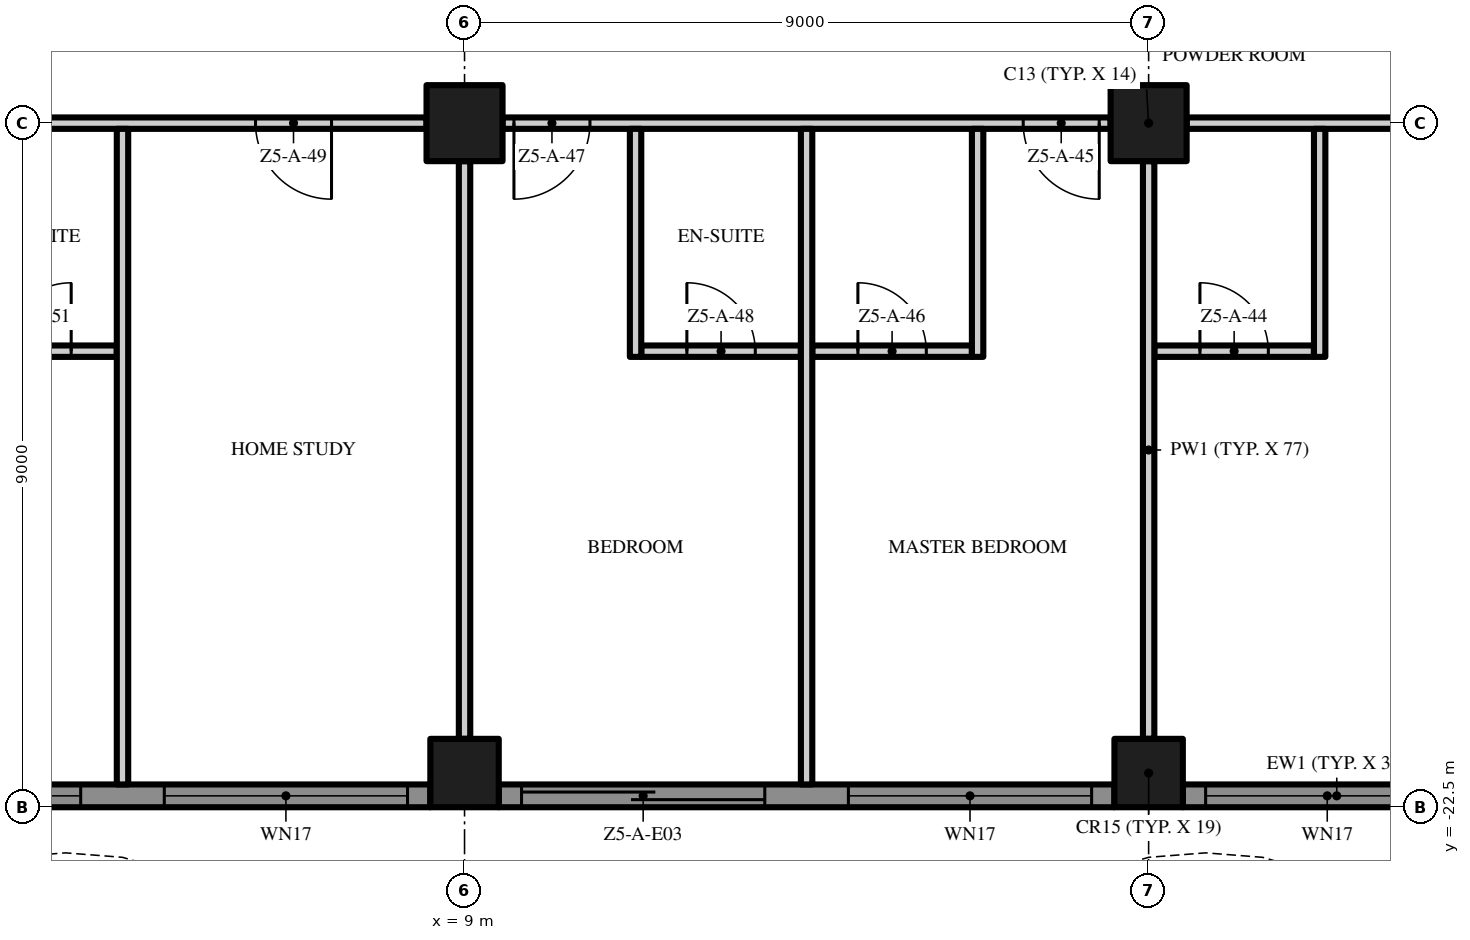
"""IFC4 building model, lengths in metres.
Left out: names, types, materials, properties, quantities, classifications, styles, units other than length and angle.
Written with IfcOpenShell. Run it as: python <this file> out.ifc"""

import sys

from ifc_helpers import new_model, si_unit, direction, frame, frame_2d, origin, origin_2d, place, context, subcontext, project, spatial, polyline, rectangle, outline, extrude, element, fill, save


model = new_model("IFC4")
c1 = context("Model", 3, precision=1e-05, world=origin(), true_north=direction((0.0, 1.0)))
c2 = subcontext(c1, "Body", "Model", "MODEL_VIEW")
j1 = project(units=[si_unit("LENGTHUNIT", "METRE"), si_unit("PLANEANGLEUNIT", "RADIAN")], contexts=[c1])
p1 = place(None, origin())
s1 = spatial("IfcSite", under=j1, at=p1, CompositionType="ELEMENT")
p2 = place(p1, origin())
s2 = spatial("IfcBuilding", under=s1, at=p2, CompositionType="ELEMENT")
p3 = place(p2, frame((0.0, 0.0, 242.6)))
s3 = spatial("IfcBuildingStorey", under=s2, at=p3, CompositionType="ELEMENT", Elevation=242.6)
p4 = place(p3, frame((18.0, -13.5, 0.0), z_axis=(0.0, 0.0, 1.0), x_axis=(1.0, 0.0, 0.0)))
e1 = element("IfcColumn", 1, at=p4, inside=s3, PredefinedType="COLUMN", context=c2, shape_type="SweptSolid", body=[
    extrude(rectangle(XDim=1.0, YDim=1.0, at=origin_2d()), origin(), (0.0, 0.0, 1.0), 3.5),
])
p5 = place(p3, frame((18.0, -22.05, 0.0), z_axis=(0.0, 0.0, 1.0), x_axis=(1.0, 0.0, 0.0)))
e2 = element("IfcColumn", 2, at=p5, inside=s3, PredefinedType="COLUMN", context=c2, shape_type="SweptSolid", body=[
    extrude(rectangle(XDim=0.9, YDim=0.9, at=origin_2d()), origin(), (0.0, 0.0, 1.0), 3.5),
])
p6 = place(p3, frame((9.0, -13.5, 0.0), z_axis=(0.0, 0.0, 1.0), x_axis=(1.0, 0.0, 0.0)))
e3 = element("IfcColumn", 3, at=p6, inside=s3, PredefinedType="COLUMN", context=c2, shape_type="SweptSolid", body=[
    extrude(rectangle(XDim=1.0, YDim=1.0, at=origin_2d()), origin(), (0.0, 0.0, 1.0), 3.5),
])
p7 = place(p3, frame((9.0, -22.05, 0.0), z_axis=(0.0, 0.0, 1.0), x_axis=(1.0, 0.0, 0.0)))
e4 = element("IfcColumn", 4, at=p7, inside=s3, PredefinedType="COLUMN", context=c2, shape_type="SweptSolid", body=[
    extrude(rectangle(XDim=0.9, YDim=0.9, at=origin_2d()), origin(), (0.0, 0.0, 1.0), 3.5),
])
p8 = place(p3, frame((8.55, -22.35, 0.0), z_axis=(0.0, 0.0, 1.0), x_axis=(-1.0, 0.0, 0.0)))
e5 = element("IfcWall", 5, at=p8, inside=s3, PredefinedType="SOLIDWALL", context=c2, shape_type="SweptSolid", body=[
    extrude(rectangle(XDim=8.1, YDim=0.3, at=frame_2d((4.05, 0.0))), origin(), (0.0, 0.0, 1.0), 3.5),
])
p9 = place(p8, frame((4.6, 0.0, 0.45)))
e6 = element("IfcOpeningElement", 6, at=p9, cuts=e5, PredefinedType="OPENING", context=c2, shape_type="SweptSolid", body=[
    extrude(rectangle(XDim=3.2, YDim=2.65, at=frame_2d((1.6, 1.325))), frame((0.0, 0.16, 0.0), z_axis=(0.0, -1.0, 0.0), x_axis=(1.0, 0.0, 0.0)), (0.0, 0.0, 1.0), 0.32),
])
p10 = place(p8, frame((0.3, 0.0, 0.45)))
e7 = element("IfcOpeningElement", 7, at=p10, cuts=e5, PredefinedType="OPENING", context=c2, shape_type="SweptSolid", body=[
    extrude(rectangle(XDim=3.2, YDim=2.65, at=frame_2d((1.6, 1.325))), frame((0.0, 0.16, 0.0), z_axis=(0.0, -1.0, 0.0), x_axis=(1.0, 0.0, 0.0)), (0.0, 0.0, 1.0), 0.32),
])
p11 = place(p3, frame((17.55, -22.35, 0.0), z_axis=(0.0, 0.0, 1.0), x_axis=(-1.0, 0.0, 0.0)))
e8 = element("IfcWall", 8, at=p11, inside=s3, PredefinedType="SOLIDWALL", context=c2, shape_type="SweptSolid", body=[
    extrude(rectangle(XDim=8.1, YDim=0.3, at=frame_2d((4.05, 0.0))), origin(), (0.0, 0.0, 1.0), 3.5),
])
p12 = place(p11, frame((4.6, 0.0, 0.0)))
e9 = element("IfcOpeningElement", 9, at=p12, cuts=e8, PredefinedType="OPENING", context=c2, shape_type="SweptSolid", body=[
    extrude(rectangle(XDim=3.2, YDim=2.4, at=frame_2d((1.6, 1.2))), frame((0.0, 0.16, 0.0), z_axis=(0.0, -1.0, 0.0), x_axis=(1.0, 0.0, 0.0)), (0.0, 0.0, 1.0), 0.32),
])
p13 = place(p11, frame((0.3, 0.0, 0.45)))
e10 = element("IfcOpeningElement", 10, at=p13, cuts=e8, PredefinedType="OPENING", context=c2, shape_type="SweptSolid", body=[
    extrude(rectangle(XDim=3.2, YDim=2.65, at=frame_2d((1.6, 1.325))), frame((0.0, 0.16, 0.0), z_axis=(0.0, -1.0, 0.0), x_axis=(1.0, 0.0, 0.0)), (0.0, 0.0, 1.0), 0.32),
])
p14 = place(p3, frame((22.5, -22.35, 0.0), z_axis=(0.0, 0.0, 1.0), x_axis=(-1.0, 0.0, 0.0)))
e11 = element("IfcWall", 11, at=p14, inside=s3, PredefinedType="SOLIDWALL", context=c2, shape_type="SweptSolid", body=[
    extrude(rectangle(XDim=4.05, YDim=0.3, at=frame_2d((2.025, 0.0))), origin(), (0.0, 0.0, 1.0), 3.5),
])
p15 = place(p14, frame((0.55, 0.0, 0.45)))
e12 = element("IfcOpeningElement", 12, at=p15, cuts=e11, PredefinedType="OPENING", context=c2, shape_type="SweptSolid", body=[
    extrude(rectangle(XDim=3.2, YDim=2.65, at=frame_2d((1.6, 1.325))), frame((0.0, 0.16, 0.0), z_axis=(0.0, -1.0, 0.0), x_axis=(1.0, 0.0, 0.0)), (0.0, 0.0, 1.0), 0.32),
])
p16 = place(p3, origin())
e13 = element("IfcWall", 13, at=p16, inside=s3, PredefinedType="USERDEFINED", context=c2, shape_type="SweptSolid", body=[
    extrude(outline(polyline([(-22.5, -24.3), (-21.0, -25.005), (-19.5, -25.441), (-18.75, -25.5), (-18.0, -25.441), (-16.5, -25.005), (-15.0, -24.3), (-13.5, -23.595), (-12.0, -23.159), (-11.25, -23.1), (-10.5, -23.159), (-9.0, -23.595), (-7.5, -24.3), (-6.0, -25.005), (-4.5, -25.441), (-3.75, -25.5), (-3.0, -25.441), (-1.5, -25.005), (0.0, -24.3), (1.5, -23.595), (3.0, -23.159), (3.75, -23.1), (4.5, -23.159), (6.0, -23.595), (7.5, -24.3), (9.0, -25.005), (10.5, -25.441), (11.25, -25.5), (12.0, -25.441), (13.5, -25.005), (15.0, -24.3), (16.5, -23.595), (18.0, -23.159), (18.75, -23.1), (19.5, -23.159), (21.0, -23.595), (22.5, -24.3), (22.606, -24.074), (21.089, -23.36), (19.545, -22.911), (18.75, -22.849), (17.955, -22.911), (16.411, -23.36), (14.894, -24.074), (13.411, -24.771), (11.955, -25.194), (11.25, -25.249), (10.545, -25.194), (9.089, -24.771), (7.606, -24.074), (6.089, -23.36), (4.545, -22.911), (3.75, -22.849), (2.955, -22.911), (1.411, -23.36), (-0.106, -24.074), (-1.589, -24.771), (-3.045, -25.194), (-3.75, -25.249), (-4.455, -25.194), (-5.911, -24.771), (-7.394, -24.074), (-8.911, -23.36), (-10.455, -22.911), (-11.25, -22.849), (-12.045, -22.911), (-13.589, -23.36), (-15.106, -24.074), (-16.589, -24.771), (-18.045, -25.194), (-18.75, -25.249), (-19.455, -25.194), (-20.911, -24.771), (-22.394, -24.074), (-22.5, -24.3)])), origin(), (0.0, 0.0, 1.0), 0.9),
])
p17 = place(p3, frame((2.325, -16.5, 0.0), z_axis=(0.0, 0.0, 1.0), x_axis=(1.0, 0.0, 0.0)))
e14 = element("IfcWall", 14, at=p17, inside=s3, PredefinedType="PARTITIONING", context=c2, shape_type="SweptSolid", body=[
    extrude(rectangle(XDim=2.1, YDim=0.15, at=frame_2d((1.05, 0.0))), origin(), (0.0, 0.0, 1.0), 3.5),
])
p18 = place(p17, frame((0.6, 0.0, 0.0)))
e15 = element("IfcOpeningElement", 15, at=p18, cuts=e14, PredefinedType="OPENING", context=c2, shape_type="SweptSolid", body=[
    extrude(rectangle(XDim=0.9, YDim=2.1, at=frame_2d((0.45, 1.05))), frame((0.0, 0.085, 0.0), z_axis=(0.0, -1.0, 0.0), x_axis=(1.0, 0.0, 0.0)), (0.0, 0.0, 1.0), 0.17),
])
p19 = place(p3, frame((11.325, -16.5, 0.0), z_axis=(0.0, 0.0, 1.0), x_axis=(1.0, 0.0, 0.0)))
e16 = element("IfcWall", 16, at=p19, inside=s3, PredefinedType="PARTITIONING", context=c2, shape_type="SweptSolid", body=[
    extrude(rectangle(XDim=2.1, YDim=0.15, at=frame_2d((1.05, 0.0))), origin(), (0.0, 0.0, 1.0), 3.5),
])
p20 = place(p19, frame((0.6, 0.0, 0.0)))
e17 = element("IfcOpeningElement", 17, at=p20, cuts=e16, PredefinedType="OPENING", context=c2, shape_type="SweptSolid", body=[
    extrude(rectangle(XDim=0.9, YDim=2.1, at=frame_2d((0.45, 1.05))), frame((0.0, 0.085, 0.0), z_axis=(0.0, -1.0, 0.0), x_axis=(1.0, 0.0, 0.0)), (0.0, 0.0, 1.0), 0.17),
])
p21 = place(p3, frame((13.575, -16.5, 0.0), z_axis=(0.0, 0.0, 1.0), x_axis=(1.0, 0.0, 0.0)))
e18 = element("IfcWall", 18, at=p21, inside=s3, PredefinedType="PARTITIONING", context=c2, shape_type="SweptSolid", body=[
    extrude(rectangle(XDim=2.1, YDim=0.15, at=frame_2d((1.05, 0.0))), origin(), (0.0, 0.0, 1.0), 3.5),
])
p22 = place(p21, frame((0.6, 0.0, 0.0)))
e19 = element("IfcOpeningElement", 19, at=p22, cuts=e18, PredefinedType="OPENING", context=c2, shape_type="SweptSolid", body=[
    extrude(rectangle(XDim=0.9, YDim=2.1, at=frame_2d((0.45, 1.05))), frame((0.0, 0.085, 0.0), z_axis=(0.0, -1.0, 0.0), x_axis=(1.0, 0.0, 0.0)), (0.0, 0.0, 1.0), 0.17),
])
p23 = place(p3, frame((18.075, -16.5, 0.0), z_axis=(0.0, 0.0, 1.0), x_axis=(1.0, 0.0, 0.0)))
e20 = element("IfcWall", 20, at=p23, inside=s3, PredefinedType="PARTITIONING", context=c2, shape_type="SweptSolid", body=[
    extrude(rectangle(XDim=2.1, YDim=0.15, at=frame_2d((1.05, 0.0))), origin(), (0.0, 0.0, 1.0), 3.5),
])
p24 = place(p23, frame((0.6, 0.0, 0.0)))
e21 = element("IfcOpeningElement", 21, at=p24, cuts=e20, PredefinedType="OPENING", context=c2, shape_type="SweptSolid", body=[
    extrude(rectangle(XDim=0.9, YDim=2.1, at=frame_2d((0.45, 1.05))), frame((0.0, 0.085, 0.0), z_axis=(0.0, -1.0, 0.0), x_axis=(1.0, 0.0, 0.0)), (0.0, 0.0, 1.0), 0.17),
])
p25 = place(p3, frame((8.5, -13.5, 0.0), z_axis=(0.0, 0.0, 1.0), x_axis=(-1.0, 0.0, 0.0)))
e22 = element("IfcWall", 22, at=p25, inside=s3, PredefinedType="PARTITIONING", context=c2, shape_type="SweptSolid", body=[
    extrude(rectangle(XDim=8.0, YDim=0.15, at=frame_2d((4.0, 0.0))), origin(), (0.0, 0.0, 1.0), 3.5),
])
p26 = place(p25, frame((1.25, 0.0, 0.0)))
e23 = element("IfcOpeningElement", 23, at=p26, cuts=e22, PredefinedType="OPENING", context=c2, shape_type="SweptSolid", body=[
    extrude(rectangle(XDim=1.0, YDim=2.4, at=frame_2d((0.5, 1.2))), frame((0.0, 0.085, 0.0), z_axis=(0.0, -1.0, 0.0), x_axis=(1.0, 0.0, 0.0)), (0.0, 0.0, 1.0), 0.17),
])
p27 = place(p25, frame((6.85, 0.0, 0.0)))
e24 = element("IfcOpeningElement", 24, at=p27, cuts=e22, PredefinedType="OPENING", context=c2, shape_type="SweptSolid", body=[
    extrude(rectangle(XDim=1.0, YDim=2.4, at=frame_2d((0.5, 1.2))), frame((0.0, 0.085, 0.0), z_axis=(0.0, -1.0, 0.0), x_axis=(1.0, 0.0, 0.0)), (0.0, 0.0, 1.0), 0.17),
])
p28 = place(p3, frame((17.5, -13.5, 0.0), z_axis=(0.0, 0.0, 1.0), x_axis=(-1.0, 0.0, 0.0)))
e25 = element("IfcWall", 25, at=p28, inside=s3, PredefinedType="PARTITIONING", context=c2, shape_type="SweptSolid", body=[
    extrude(rectangle(XDim=8.0, YDim=0.15, at=frame_2d((4.0, 0.0))), origin(), (0.0, 0.0, 1.0), 3.5),
])
p29 = place(p28, frame((0.15, 0.0, 0.0)))
e26 = element("IfcOpeningElement", 26, at=p29, cuts=e25, PredefinedType="OPENING", context=c2, shape_type="SweptSolid", body=[
    extrude(rectangle(XDim=1.0, YDim=2.4, at=frame_2d((0.5, 1.2))), frame((0.0, 0.085, 0.0), z_axis=(0.0, -1.0, 0.0), x_axis=(1.0, 0.0, 0.0)), (0.0, 0.0, 1.0), 0.17),
])
p30 = place(p28, frame((6.85, 0.0, 0.0)))
e27 = element("IfcOpeningElement", 27, at=p30, cuts=e25, PredefinedType="OPENING", context=c2, shape_type="SweptSolid", body=[
    extrude(rectangle(XDim=1.0, YDim=2.4, at=frame_2d((0.5, 1.2))), frame((0.0, 0.085, 0.0), z_axis=(0.0, -1.0, 0.0), x_axis=(1.0, 0.0, 0.0)), (0.0, 0.0, 1.0), 0.17),
])
p31 = place(p3, frame((26.1, -13.5, 0.0), z_axis=(0.0, 0.0, 1.0), x_axis=(-1.0, 0.0, 0.0)))
e28 = element("IfcWall", 28, at=p31, inside=s3, PredefinedType="PARTITIONING", context=c2, shape_type="SweptSolid", body=[
    extrude(rectangle(XDim=7.6, YDim=0.15, at=frame_2d((3.8, 0.0))), origin(), (0.0, 0.0, 1.0), 3.5),
])
p32 = place(p31, frame((1.6, 0.0, 0.0)))
e29 = element("IfcOpeningElement", 29, at=p32, cuts=e28, PredefinedType="OPENING", context=c2, shape_type="SweptSolid", body=[
    extrude(rectangle(XDim=1.8, YDim=2.4, at=frame_2d((0.9, 1.2))), frame((0.0, 0.085, 0.0), z_axis=(0.0, -1.0, 0.0), x_axis=(1.0, 0.0, 0.0)), (0.0, 0.0, 1.0), 0.17),
])
p33 = place(p3, frame((4.5, -22.2, 0.0), z_axis=(0.0, 0.0, 1.0), x_axis=(0.0, 1.0, 0.0)))
e30 = element("IfcWall", 30, at=p33, inside=s3, PredefinedType="PARTITIONING", context=c2, shape_type="SweptSolid", body=[
    extrude(rectangle(XDim=8.625, YDim=0.15, at=frame_2d((4.312, 0.0))), origin(), (0.0, 0.0, 1.0), 3.5),
])
p34 = place(p3, frame((9.0, -21.6, 0.0), z_axis=(0.0, 0.0, 1.0), x_axis=(0.0, 1.0, 0.0)))
e31 = element("IfcWall", 31, at=p34, inside=s3, PredefinedType="PARTITIONING", context=c2, shape_type="SweptSolid", body=[
    extrude(rectangle(XDim=7.6, YDim=0.15, at=frame_2d((3.8, 0.0))), origin(), (0.0, 0.0, 1.0), 3.5),
])
p35 = place(p3, frame((11.25, -16.575, 0.0), z_axis=(0.0, 0.0, 1.0), x_axis=(0.0, 1.0, 0.0)))
e32 = element("IfcWall", 32, at=p35, inside=s3, PredefinedType="PARTITIONING", context=c2, shape_type="SweptSolid", body=[
    extrude(rectangle(XDim=3.0, YDim=0.15, at=frame_2d((1.5, 0.0))), origin(), (0.0, 0.0, 1.0), 3.5),
])
p36 = place(p3, frame((13.5, -22.2, 0.0), z_axis=(0.0, 0.0, 1.0), x_axis=(0.0, 1.0, 0.0)))
e33 = element("IfcWall", 33, at=p36, inside=s3, PredefinedType="PARTITIONING", context=c2, shape_type="SweptSolid", body=[
    extrude(rectangle(XDim=8.625, YDim=0.15, at=frame_2d((4.312, 0.0))), origin(), (0.0, 0.0, 1.0), 3.5),
])
p37 = place(p3, frame((15.75, -16.575, 0.0), z_axis=(0.0, 0.0, 1.0), x_axis=(0.0, 1.0, 0.0)))
e34 = element("IfcWall", 34, at=p37, inside=s3, PredefinedType="PARTITIONING", context=c2, shape_type="SweptSolid", body=[
    extrude(rectangle(XDim=3.0, YDim=0.15, at=frame_2d((1.5, 0.0))), origin(), (0.0, 0.0, 1.0), 3.5),
])
p38 = place(p3, frame((18.0, -21.6, 0.0), z_axis=(0.0, 0.0, 1.0), x_axis=(0.0, 1.0, 0.0)))
e35 = element("IfcWall", 35, at=p38, inside=s3, PredefinedType="PARTITIONING", context=c2, shape_type="SweptSolid", body=[
    extrude(rectangle(XDim=7.6, YDim=0.15, at=frame_2d((3.8, 0.0))), origin(), (0.0, 0.0, 1.0), 3.5),
])
p39 = place(p3, frame((20.25, -16.575, 0.0), z_axis=(0.0, 0.0, 1.0), x_axis=(0.0, 1.0, 0.0)))
e36 = element("IfcWall", 36, at=p39, inside=s3, PredefinedType="PARTITIONING", context=c2, shape_type="SweptSolid", body=[
    extrude(rectangle(XDim=3.0, YDim=0.15, at=frame_2d((1.5, 0.0))), origin(), (0.0, 0.0, 1.0), 3.5),
])
p40 = place(p9, origin())
e37 = element("IfcWindow", 37, at=p40, inside=s3, PartitioningType="SINGLE_PANEL", PredefinedType="WINDOW", context=c2, shape_type="SweptSolid", body=[
    extrude(rectangle(XDim=3.2, YDim=2.65, at=frame_2d((1.6, 1.325))), frame((0.0, 0.03, 0.0), z_axis=(0.0, -1.0, 0.0), x_axis=(1.0, 0.0, 0.0)), (0.0, 0.0, 1.0), 0.06),
])
fill(e6, e37)
p41 = place(p10, origin())
e38 = element("IfcWindow", 38, at=p41, inside=s3, PartitioningType="SINGLE_PANEL", PredefinedType="WINDOW", context=c2, shape_type="SweptSolid", body=[
    extrude(rectangle(XDim=3.2, YDim=2.65, at=frame_2d((1.6, 1.325))), frame((0.0, 0.03, 0.0), z_axis=(0.0, -1.0, 0.0), x_axis=(1.0, 0.0, 0.0)), (0.0, 0.0, 1.0), 0.06),
])
fill(e7, e38)
p42 = place(p12, origin())
e39 = element("IfcDoor", 39, at=p42, inside=s3, OperationType="SINGLE_SWING_LEFT", PredefinedType="DOOR", context=c2, shape_type="SweptSolid", body=[
    extrude(rectangle(XDim=3.2, YDim=2.4, at=frame_2d((1.6, 1.2))), frame((0.0, 0.025, 0.0), z_axis=(0.0, -1.0, 0.0), x_axis=(1.0, 0.0, 0.0)), (0.0, 0.0, 1.0), 0.05),
])
fill(e9, e39)
p43 = place(p13, origin())
e40 = element("IfcWindow", 40, at=p43, inside=s3, PartitioningType="SINGLE_PANEL", PredefinedType="WINDOW", context=c2, shape_type="SweptSolid", body=[
    extrude(rectangle(XDim=3.2, YDim=2.65, at=frame_2d((1.6, 1.325))), frame((0.0, 0.03, 0.0), z_axis=(0.0, -1.0, 0.0), x_axis=(1.0, 0.0, 0.0)), (0.0, 0.0, 1.0), 0.06),
])
fill(e10, e40)
p44 = place(p15, origin())
e41 = element("IfcWindow", 41, at=p44, inside=s3, PartitioningType="SINGLE_PANEL", PredefinedType="WINDOW", context=c2, shape_type="SweptSolid", body=[
    extrude(rectangle(XDim=3.2, YDim=2.65, at=frame_2d((1.6, 1.325))), frame((0.0, 0.03, 0.0), z_axis=(0.0, -1.0, 0.0), x_axis=(1.0, 0.0, 0.0)), (0.0, 0.0, 1.0), 0.06),
])
fill(e12, e41)
p45 = place(p24, origin())
e42 = element("IfcDoor", 42, at=p45, inside=s3, OperationType="SINGLE_SWING_LEFT", PredefinedType="DOOR", context=c2, shape_type="SweptSolid", body=[
    extrude(rectangle(XDim=0.9, YDim=2.1, at=frame_2d((0.45, 1.05))), frame((0.0, 0.025, 0.0), z_axis=(0.0, -1.0, 0.0), x_axis=(1.0, 0.0, 0.0)), (0.0, 0.0, 1.0), 0.05),
])
fill(e21, e42)
p46 = place(p29, origin())
e43 = element("IfcDoor", 43, at=p46, inside=s3, OperationType="SINGLE_SWING_LEFT", PredefinedType="DOOR", context=c2, shape_type="SweptSolid", body=[
    extrude(rectangle(XDim=1.0, YDim=2.4, at=frame_2d((0.5, 1.2))), frame((0.0, 0.025, 0.0), z_axis=(0.0, -1.0, 0.0), x_axis=(1.0, 0.0, 0.0)), (0.0, 0.0, 1.0), 0.05),
])
fill(e26, e43)
p47 = place(p22, origin())
e44 = element("IfcDoor", 44, at=p47, inside=s3, OperationType="SINGLE_SWING_LEFT", PredefinedType="DOOR", context=c2, shape_type="SweptSolid", body=[
    extrude(rectangle(XDim=0.9, YDim=2.1, at=frame_2d((0.45, 1.05))), frame((0.0, 0.025, 0.0), z_axis=(0.0, -1.0, 0.0), x_axis=(1.0, 0.0, 0.0)), (0.0, 0.0, 1.0), 0.05),
])
fill(e19, e44)
p48 = place(p30, origin())
e45 = element("IfcDoor", 45, at=p48, inside=s3, OperationType="SINGLE_SWING_RIGHT", PredefinedType="DOOR", context=c2, shape_type="SweptSolid", body=[
    extrude(rectangle(XDim=1.0, YDim=2.4, at=frame_2d((0.5, 1.2))), frame((0.0, 0.025, 0.0), z_axis=(0.0, -1.0, 0.0), x_axis=(1.0, 0.0, 0.0)), (0.0, 0.0, 1.0), 0.05),
])
fill(e27, e45)
p49 = place(p20, origin())
e46 = element("IfcDoor", 46, at=p49, inside=s3, OperationType="SINGLE_SWING_LEFT", PredefinedType="DOOR", context=c2, shape_type="SweptSolid", body=[
    extrude(rectangle(XDim=0.9, YDim=2.1, at=frame_2d((0.45, 1.05))), frame((0.0, 0.025, 0.0), z_axis=(0.0, -1.0, 0.0), x_axis=(1.0, 0.0, 0.0)), (0.0, 0.0, 1.0), 0.05),
])
fill(e17, e46)
p50 = place(p26, origin())
e47 = element("IfcDoor", 47, at=p50, inside=s3, OperationType="SINGLE_SWING_LEFT", PredefinedType="DOOR", context=c2, shape_type="SweptSolid", body=[
    extrude(rectangle(XDim=1.0, YDim=2.4, at=frame_2d((0.5, 1.2))), frame((0.0, 0.025, 0.0), z_axis=(0.0, -1.0, 0.0), x_axis=(1.0, 0.0, 0.0)), (0.0, 0.0, 1.0), 0.05),
])
fill(e23, e47)
p51 = place(p18, origin())
e48 = element("IfcDoor", 48, at=p51, inside=s3, OperationType="SINGLE_SWING_RIGHT", PredefinedType="DOOR", context=c2, shape_type="SweptSolid", body=[
    extrude(rectangle(XDim=0.9, YDim=2.1, at=frame_2d((0.45, 1.05))), frame((0.0, 0.025, 0.0), z_axis=(0.0, -1.0, 0.0), x_axis=(1.0, 0.0, 0.0)), (0.0, 0.0, 1.0), 0.05),
])
fill(e15, e48)
save(model, sys.argv[1])
